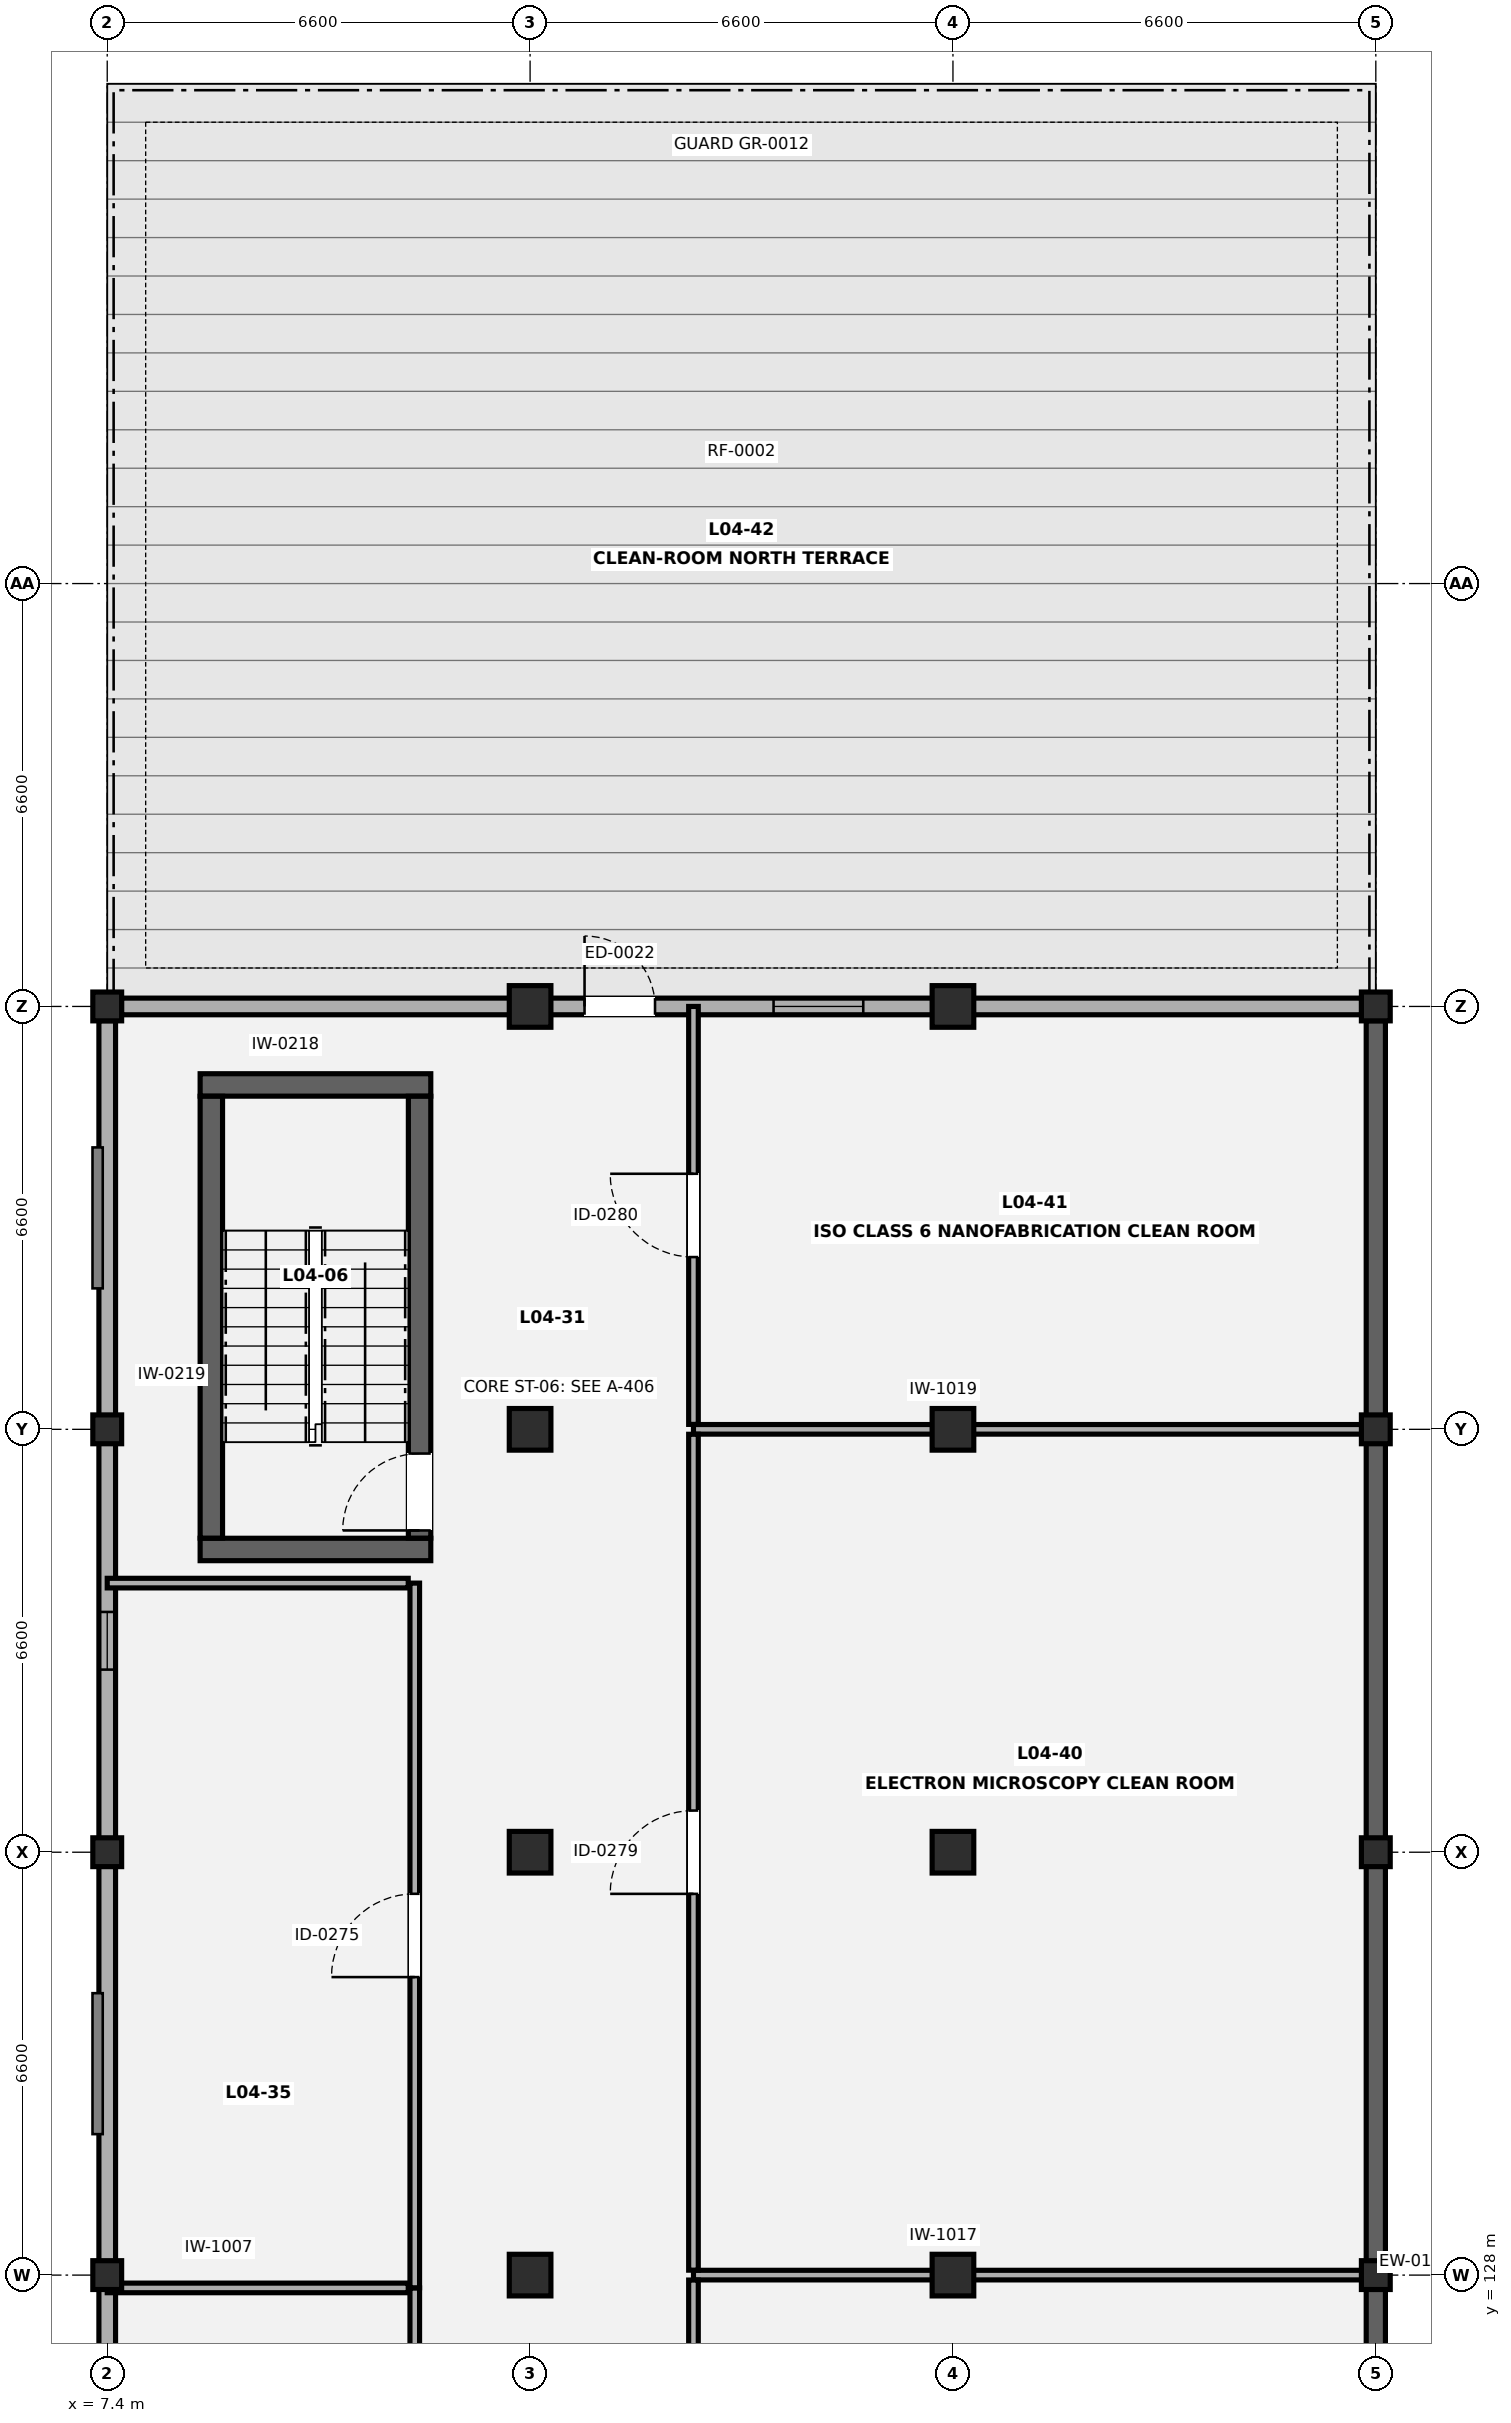
"""IFC4 building model, lengths in metres.
Left out: names, types, materials, properties, quantities, classifications, styles, units other than length and angle.
Written with IfcOpenShell. Run it as: python <this file> out.ifc"""

import sys

from ifc_helpers import new_model, si_unit, direction, frame, frame_2d, origin, origin_2d, place, context, subcontext, project, spatial, rectangle, extrude, element, fill, save


model = new_model("IFC4")
c1 = context("Model", 3, precision=1e-05, world=origin(), true_north=direction((0.0, 1.0)))
c2 = subcontext(c1, "Body", "Model", "MODEL_VIEW")
j1 = project(units=[si_unit("LENGTHUNIT", "METRE"), si_unit("PLANEANGLEUNIT", "RADIAN")], contexts=[c1])
p1 = place(None, origin())
s1 = spatial("IfcSite", under=j1, at=p1, CompositionType="ELEMENT")
p2 = place(p1, origin())
s2 = spatial("IfcBuilding", under=s1, at=p2, CompositionType="ELEMENT")
p3 = place(p2, frame((0.0, 0.0, 17.5)))
s3 = spatial("IfcBuildingStorey", under=s2, at=p3, CompositionType="ELEMENT", Elevation=17.5)
for number, where, z_axis, x_axis in (
    (1, (7.4, 128.0, 0.0), (0.0, 0.0, 1.0), (1.0, 0.0, 0.0)),
    (2, (7.4, 134.6, 0.0), (0.0, 0.0, 1.0), (1.0, 0.0, 0.0)),
    (3, (7.4, 141.2, 0.0), (0.0, 0.0, 1.0), (1.0, 0.0, 0.0)),
    (4, (7.4, 147.8, 0.0), (0.0, 0.0, 1.0), (1.0, 0.0, 0.0)),
):
    element("IfcColumn", number, at=place(p3, frame(where, z_axis=z_axis, x_axis=x_axis)), inside=s3, PredefinedType="PILASTER", context=c2, shape_type="SweptSolid", body=[
        extrude(rectangle(XDim=0.45, YDim=0.45, at=origin_2d()), origin(), (0.0, 0.0, 1.0), 4.2),
    ])
for number, where, z_axis, x_axis in (
    (5, (14.0, 128.0, 0.0), (0.0, 0.0, 1.0), (1.0, 0.0, 0.0)),
    (6, (14.0, 134.6, 0.0), (0.0, 0.0, 1.0), (1.0, 0.0, 0.0)),
    (7, (14.0, 141.2, 0.0), (0.0, 0.0, 1.0), (1.0, 0.0, 0.0)),
    (8, (14.0, 147.8, 0.0), (0.0, 0.0, 1.0), (1.0, 0.0, 0.0)),
    (9, (20.6, 128.0, 0.0), (0.0, 0.0, 1.0), (1.0, 0.0, 0.0)),
    (10, (20.6, 134.6, 0.0), (0.0, 0.0, 1.0), (1.0, 0.0, 0.0)),
    (11, (20.6, 141.2, 0.0), (0.0, 0.0, 1.0), (1.0, 0.0, 0.0)),
    (12, (20.6, 147.8, 0.0), (0.0, 0.0, 1.0), (1.0, 0.0, 0.0)),
):
    element("IfcColumn", number, at=place(p3, frame(where, z_axis=z_axis, x_axis=x_axis)), inside=s3, PredefinedType="COLUMN", context=c2, shape_type="SweptSolid", body=[
        extrude(rectangle(XDim=0.65, YDim=0.65, at=origin_2d()), origin(), (0.0, 0.0, 1.0), 4.2),
    ])
for number, where, z_axis, x_axis in (
    (13, (27.2, 128.0, 0.0), (0.0, 0.0, 1.0), (1.0, 0.0, 0.0)),
    (14, (27.2, 134.6, 0.0), (0.0, 0.0, 1.0), (1.0, 0.0, 0.0)),
    (15, (27.2, 141.2, 0.0), (0.0, 0.0, 1.0), (1.0, 0.0, 0.0)),
    (16, (27.2, 147.8, 0.0), (0.0, 0.0, 1.0), (1.0, 0.0, 0.0)),
):
    element("IfcColumn", number, at=place(p3, frame(where, z_axis=z_axis, x_axis=x_axis)), inside=s3, PredefinedType="PILASTER", context=c2, shape_type="SweptSolid", body=[
        extrude(rectangle(XDim=0.45, YDim=0.45, at=origin_2d()), origin(), (0.0, 0.0, 1.0), 4.2),
    ])
p4 = place(p3, frame((27.2, 147.577, 0.0), z_axis=(0.0, 0.0, 1.0), x_axis=(0.0, -1.0, 0.0)))
e17 = element("IfcWall", 17, at=p4, inside=s3, PredefinedType="SOLIDWALL", context=c2, shape_type="SweptSolid", body=[
    extrude(rectangle(XDim=52.354, YDim=0.3, at=frame_2d((26.177, 0.0))), origin(), (0.0, 0.0, 1.0), 3.84),
])
p5 = place(p3, frame((7.4, 95.223, 0.0), z_axis=(0.0, 0.0, 1.0), x_axis=(0.0, 1.0, 0.0)))
e18 = element("IfcWall", 18, at=p5, inside=s3, PredefinedType="SOLIDWALL", context=c2, shape_type="SweptSolid", body=[
    extrude(rectangle(XDim=52.354, YDim=0.26, at=frame_2d((26.177, 0.0))), origin(), (0.0, 0.0, 1.0), 2.885),
])
p6 = place(p5, frame((15.827, 0.0, 0.85)))
e19 = element("IfcOpeningElement", 19, at=p6, cuts=e18, PredefinedType="OPENING", context=c2, shape_type="SweptSolid", body=[
    extrude(rectangle(XDim=0.9, YDim=1.35, at=frame_2d((0.45, 0.675))), frame((0.0, 0.14, 0.0), z_axis=(0.0, -1.0, 0.0), x_axis=(1.0, 0.0, 0.0)), (0.0, 0.0, 1.0), 0.28),
])
p7 = place(p5, frame((29.027, 0.0, 0.85)))
e20 = element("IfcOpeningElement", 20, at=p7, cuts=e18, PredefinedType="OPENING", context=c2, shape_type="SweptSolid", body=[
    extrude(rectangle(XDim=0.9, YDim=1.35, at=frame_2d((0.45, 0.675))), frame((0.0, 0.14, 0.0), z_axis=(0.0, -1.0, 0.0), x_axis=(1.0, 0.0, 0.0)), (0.0, 0.0, 1.0), 0.28),
])
p8 = place(p5, frame((42.227, 0.0, 0.85)))
e21 = element("IfcOpeningElement", 21, at=p8, cuts=e18, PredefinedType="OPENING", context=c2, shape_type="SweptSolid", body=[
    extrude(rectangle(XDim=0.9, YDim=1.35, at=frame_2d((0.45, 0.675))), frame((0.0, 0.14, 0.0), z_axis=(0.0, -1.0, 0.0), x_axis=(1.0, 0.0, 0.0)), (0.0, 0.0, 1.0), 0.28),
])
p9 = place(p3, frame((7.623, 147.8, 0.0), z_axis=(0.0, 0.0, 1.0), x_axis=(1.0, 0.0, 0.0)))
e22 = element("IfcWall", 22, at=p9, inside=s3, PredefinedType="SOLIDWALL", context=c2, shape_type="SweptSolid", body=[
    extrude(rectangle(XDim=19.354, YDim=0.26, at=frame_2d((9.677, 0.0))), origin(), (0.0, 0.0, 1.0), 2.48),
])
p10 = place(p9, frame((7.227, 0.0, 0.0)))
e23 = element("IfcOpeningElement", 23, at=p10, cuts=e22, PredefinedType="OPENING", context=c2, shape_type="SweptSolid", body=[
    extrude(rectangle(XDim=1.1, YDim=2.15, at=frame_2d((0.55, 1.075))), frame((0.0, 0.14, 0.0), z_axis=(0.0, -1.0, 0.0), x_axis=(1.0, 0.0, 0.0)), (0.0, 0.0, 1.0), 0.28),
])
p11 = place(p9, frame((10.177, 0.0, 0.85)))
e24 = element("IfcOpeningElement", 24, at=p11, cuts=e22, PredefinedType="OPENING", context=c2, shape_type="SweptSolid", body=[
    extrude(rectangle(XDim=1.4, YDim=1.4, at=frame_2d((0.7, 0.7))), frame((0.0, 0.14, 0.0), z_axis=(0.0, -1.0, 0.0), x_axis=(1.0, 0.0, 0.0)), (0.0, 0.0, 1.0), 0.28),
])
for number, where, z_axis, x_axis in (
    (25, (8.85, 139.325, 0.0), (0.0, 0.0, 1.0), (1.0, 0.0, 0.0)),
    (26, (8.85, 146.575, 0.0), (0.0, 0.0, 1.0), (1.0, 0.0, 0.0)),
):
    element("IfcWall", number, at=place(p3, frame(where, z_axis=z_axis, x_axis=x_axis)), inside=s3, PredefinedType="SHEAR", context=c2, shape_type="SweptSolid", body=[
        extrude(rectangle(XDim=3.6, YDim=0.35, at=frame_2d((1.8, 0.0))), origin(), (0.0, 0.0, 1.0), 3.85),
    ])
p12 = place(p3, frame((9.025, 139.502, 0.0), z_axis=(0.0, 0.0, 1.0), x_axis=(0.0, 1.0, 0.0)))
e27 = element("IfcWall", 27, at=p12, inside=s3, PredefinedType="SHEAR", context=c2, shape_type="SweptSolid", body=[
    extrude(rectangle(XDim=6.896, YDim=0.35, at=frame_2d((3.448, 0.0))), origin(), (0.0, 0.0, 1.0), 3.85),
])
p13 = place(p3, frame((12.275, 139.502, 0.0), z_axis=(0.0, 0.0, 1.0), x_axis=(0.0, 1.0, 0.0)))
e28 = element("IfcWall", 28, at=p13, inside=s3, PredefinedType="SHEAR", context=c2, shape_type="SweptSolid", body=[
    extrude(rectangle(XDim=6.896, YDim=0.35, at=frame_2d((3.448, 0.0))), origin(), (0.0, 0.0, 1.0), 3.85),
])
p14 = place(p13, frame((0.12, 0.0, 0.0)))
e29 = element("IfcOpeningElement", 29, at=p14, cuts=e28, PredefinedType="OPENING", context=c2, shape_type="SweptSolid", body=[
    extrude(rectangle(XDim=1.2, YDim=2.15, at=frame_2d((0.6, 1.075))), frame((0.0, 0.185, 0.0), z_axis=(0.0, -1.0, 0.0), x_axis=(1.0, 0.0, 0.0)), (0.0, 0.0, 1.0), 0.37),
])
p15 = place(p3, frame((7.4, 127.8, 0.0), z_axis=(0.0, 0.0, 1.0), x_axis=(1.0, 0.0, 0.0)))
e30 = element("IfcWall", 30, at=p15, inside=s3, PredefinedType="PARTITIONING", context=c2, shape_type="SweptSolid", body=[
    extrude(rectangle(XDim=4.698, YDim=0.15, at=frame_2d((2.349, 0.0))), origin(), (0.0, 0.0, 1.0), 2.435),
])
p16 = place(p3, frame((12.2, 114.502, 0.0), z_axis=(0.0, 0.0, 1.0), x_axis=(0.0, 1.0, 0.0)))
e31 = element("IfcWall", 31, at=p16, inside=s3, PredefinedType="PARTITIONING", context=c2, shape_type="SweptSolid", body=[
    extrude(rectangle(XDim=13.298, YDim=0.15, at=frame_2d((6.649, 0.0))), origin(), (0.0, 0.0, 1.0), 3.85),
])
p17 = place(p16, frame((5.649, 0.0, 0.0)))
e32 = element("IfcOpeningElement", 32, at=p17, cuts=e31, PredefinedType="OPENING", context=c2, shape_type="SweptSolid", body=[
    extrude(rectangle(XDim=1.3, YDim=2.2, at=frame_2d((0.65, 1.1))), frame((0.0, 0.085, 0.0), z_axis=(0.0, -1.0, 0.0), x_axis=(1.0, 0.0, 0.0)), (0.0, 0.0, 1.0), 0.17),
])
p18 = place(p3, frame((7.4, 138.8, 0.0), z_axis=(0.0, 0.0, 1.0), x_axis=(1.0, 0.0, 0.0)))
e33 = element("IfcWall", 33, at=p18, inside=s3, PredefinedType="PARTITIONING", context=c2, shape_type="SweptSolid", body=[
    extrude(rectangle(XDim=4.698, YDim=0.15, at=frame_2d((2.349, 0.0))), origin(), (0.0, 0.0, 1.0), 3.85),
])
p19 = place(p3, frame((12.2, 127.802, 0.0), z_axis=(0.0, 0.0, 1.0), x_axis=(0.0, 1.0, 0.0)))
e34 = element("IfcWall", 34, at=p19, inside=s3, PredefinedType="PARTITIONING", context=c2, shape_type="SweptSolid", body=[
    extrude(rectangle(XDim=10.998, YDim=0.15, at=frame_2d((5.499, 0.0))), origin(), (0.0, 0.0, 1.0), 3.85),
])
p20 = place(p19, frame((4.849, 0.0, 0.0)))
e35 = element("IfcOpeningElement", 35, at=p20, cuts=e34, PredefinedType="OPENING", context=c2, shape_type="SweptSolid", body=[
    extrude(rectangle(XDim=1.3, YDim=2.2, at=frame_2d((0.65, 1.1))), frame((0.0, 0.085, 0.0), z_axis=(0.0, -1.0, 0.0), x_axis=(1.0, 0.0, 0.0)), (0.0, 0.0, 1.0), 0.17),
])
p21 = place(p3, frame((16.55, 128.0, 0.0), z_axis=(0.0, 0.0, 1.0), x_axis=(1.0, 0.0, 0.0)))
e36 = element("IfcWall", 36, at=p21, inside=s3, PredefinedType="PARTITIONING", context=c2, shape_type="SweptSolid", body=[
    extrude(rectangle(XDim=10.538, YDim=0.15, at=frame_2d((5.269, 0.0))), origin(), (0.0, 0.0, 1.0), 2.435),
])
p22 = place(p3, frame((16.55, 114.877, 0.0), z_axis=(0.0, 0.0, 1.0), x_axis=(0.0, 1.0, 0.0)))
e37 = element("IfcWall", 37, at=p22, inside=s3, PredefinedType="PARTITIONING", context=c2, shape_type="SweptSolid", body=[
    extrude(rectangle(XDim=13.046, YDim=0.15, at=frame_2d((6.523, 0.0))), origin(), (0.0, 0.0, 1.0), 3.85),
])
p23 = place(p22, frame((5.873, 0.0, 0.0)))
e38 = element("IfcOpeningElement", 38, at=p23, cuts=e37, PredefinedType="OPENING", context=c2, shape_type="SweptSolid", body=[
    extrude(rectangle(XDim=1.3, YDim=2.2, at=frame_2d((0.65, 1.1))), frame((0.0, 0.085, 0.0), z_axis=(0.0, -1.0, 0.0), x_axis=(1.0, 0.0, 0.0)), (0.0, 0.0, 1.0), 0.17),
])
p24 = place(p3, frame((16.55, 141.2, 0.0), z_axis=(0.0, 0.0, 1.0), x_axis=(1.0, 0.0, 0.0)))
e39 = element("IfcWall", 39, at=p24, inside=s3, PredefinedType="PARTITIONING", context=c2, shape_type="SweptSolid", body=[
    extrude(rectangle(XDim=10.538, YDim=0.15, at=frame_2d((5.269, 0.0))), origin(), (0.0, 0.0, 1.0), 2.435),
])
p25 = place(p3, frame((16.55, 128.077, 0.0), z_axis=(0.0, 0.0, 1.0), x_axis=(0.0, 1.0, 0.0)))
e40 = element("IfcWall", 40, at=p25, inside=s3, PredefinedType="PARTITIONING", context=c2, shape_type="SweptSolid", body=[
    extrude(rectangle(XDim=13.046, YDim=0.15, at=frame_2d((6.523, 0.0))), origin(), (0.0, 0.0, 1.0), 3.85),
])
p26 = place(p25, frame((5.873, 0.0, 0.0)))
e41 = element("IfcOpeningElement", 41, at=p26, cuts=e40, PredefinedType="OPENING", context=c2, shape_type="SweptSolid", body=[
    extrude(rectangle(XDim=1.3, YDim=2.2, at=frame_2d((0.65, 1.1))), frame((0.0, 0.085, 0.0), z_axis=(0.0, -1.0, 0.0), x_axis=(1.0, 0.0, 0.0)), (0.0, 0.0, 1.0), 0.17),
])
p27 = place(p3, frame((16.55, 141.277, 0.0), z_axis=(0.0, 0.0, 1.0), x_axis=(0.0, 1.0, 0.0)))
e42 = element("IfcWall", 42, at=p27, inside=s3, PredefinedType="PARTITIONING", context=c2, shape_type="SweptSolid", body=[
    extrude(rectangle(XDim=6.523, YDim=0.15, at=frame_2d((3.261, 0.0))), origin(), (0.0, 0.0, 1.0), 3.85),
])
p28 = place(p27, frame((2.612, 0.0, 0.0)))
e43 = element("IfcOpeningElement", 43, at=p28, cuts=e42, PredefinedType="OPENING", context=c2, shape_type="SweptSolid", body=[
    extrude(rectangle(XDim=1.3, YDim=2.2, at=frame_2d((0.65, 1.1))), frame((0.0, 0.085, 0.0), z_axis=(0.0, -1.0, 0.0), x_axis=(1.0, 0.0, 0.0)), (0.0, 0.0, 1.0), 0.17),
])
p29 = place(p8, origin())
e44 = element("IfcWindow", 44, at=p29, inside=s3, PartitioningType="SINGLE_PANEL", PredefinedType="WINDOW", context=c2, shape_type="SweptSolid", body=[
    extrude(rectangle(XDim=0.9, YDim=1.35, at=frame_2d((0.45, 0.675))), frame((0.0, 0.03, 0.0), z_axis=(0.0, -1.0, 0.0), x_axis=(1.0, 0.0, 0.0)), (0.0, 0.0, 1.0), 0.06),
])
fill(e21, e44)
p30 = place(p10, origin())
e45 = element("IfcDoor", 45, at=p30, inside=s3, OperationType="SINGLE_SWING_LEFT", PredefinedType="DOOR", context=c2, shape_type="SweptSolid", body=[
    extrude(rectangle(XDim=1.1, YDim=2.15, at=frame_2d((0.55, 1.075))), frame((0.0, 0.025, 0.0), z_axis=(0.0, -1.0, 0.0), x_axis=(1.0, 0.0, 0.0)), (0.0, 0.0, 1.0), 0.05),
])
fill(e23, e45)
p31 = place(p11, origin())
e46 = element("IfcWindow", 46, at=p31, inside=s3, PartitioningType="SINGLE_PANEL", PredefinedType="WINDOW", context=c2, shape_type="SweptSolid", body=[
    extrude(rectangle(XDim=1.4, YDim=1.4, at=frame_2d((0.7, 0.7))), frame((0.0, 0.03, 0.0), z_axis=(0.0, -1.0, 0.0), x_axis=(1.0, 0.0, 0.0)), (0.0, 0.0, 1.0), 0.06),
])
fill(e24, e46)
p32 = place(p14, origin())
e47 = element("IfcDoor", 47, at=p32, inside=s3, OperationType="SINGLE_SWING_LEFT", PredefinedType="DOOR", context=c2, shape_type="SweptSolid", body=[
    extrude(rectangle(XDim=1.2, YDim=2.15, at=frame_2d((0.6, 1.075))), frame((0.0, 0.025, 0.0), z_axis=(0.0, -1.0, 0.0), x_axis=(1.0, 0.0, 0.0)), (0.0, 0.0, 1.0), 0.05),
])
fill(e29, e47)
p33 = place(p20, origin())
e48 = element("IfcDoor", 48, at=p33, inside=s3, OperationType="SINGLE_SWING_LEFT", PredefinedType="DOOR", context=c2, shape_type="SweptSolid", body=[
    extrude(rectangle(XDim=1.3, YDim=2.2, at=frame_2d((0.65, 1.1))), frame((0.0, 0.025, 0.0), z_axis=(0.0, -1.0, 0.0), x_axis=(1.0, 0.0, 0.0)), (0.0, 0.0, 1.0), 0.05),
])
fill(e35, e48)
p34 = place(p26, origin())
e49 = element("IfcDoor", 49, at=p34, inside=s3, OperationType="SINGLE_SWING_LEFT", PredefinedType="DOOR", context=c2, shape_type="SweptSolid", body=[
    extrude(rectangle(XDim=1.3, YDim=2.2, at=frame_2d((0.65, 1.1))), frame((0.0, 0.025, 0.0), z_axis=(0.0, -1.0, 0.0), x_axis=(1.0, 0.0, 0.0)), (0.0, 0.0, 1.0), 0.05),
])
fill(e41, e49)
p35 = place(p28, origin())
e50 = element("IfcDoor", 50, at=p35, inside=s3, OperationType="SINGLE_SWING_RIGHT", PredefinedType="DOOR", context=c2, shape_type="SweptSolid", body=[
    extrude(rectangle(XDim=1.3, YDim=2.2, at=frame_2d((0.65, 1.1))), frame((0.0, 0.025, 0.0), z_axis=(0.0, -1.0, 0.0), x_axis=(1.0, 0.0, 0.0)), (0.0, 0.0, 1.0), 0.05),
])
fill(e43, e50)
save(model, sys.argv[1])
